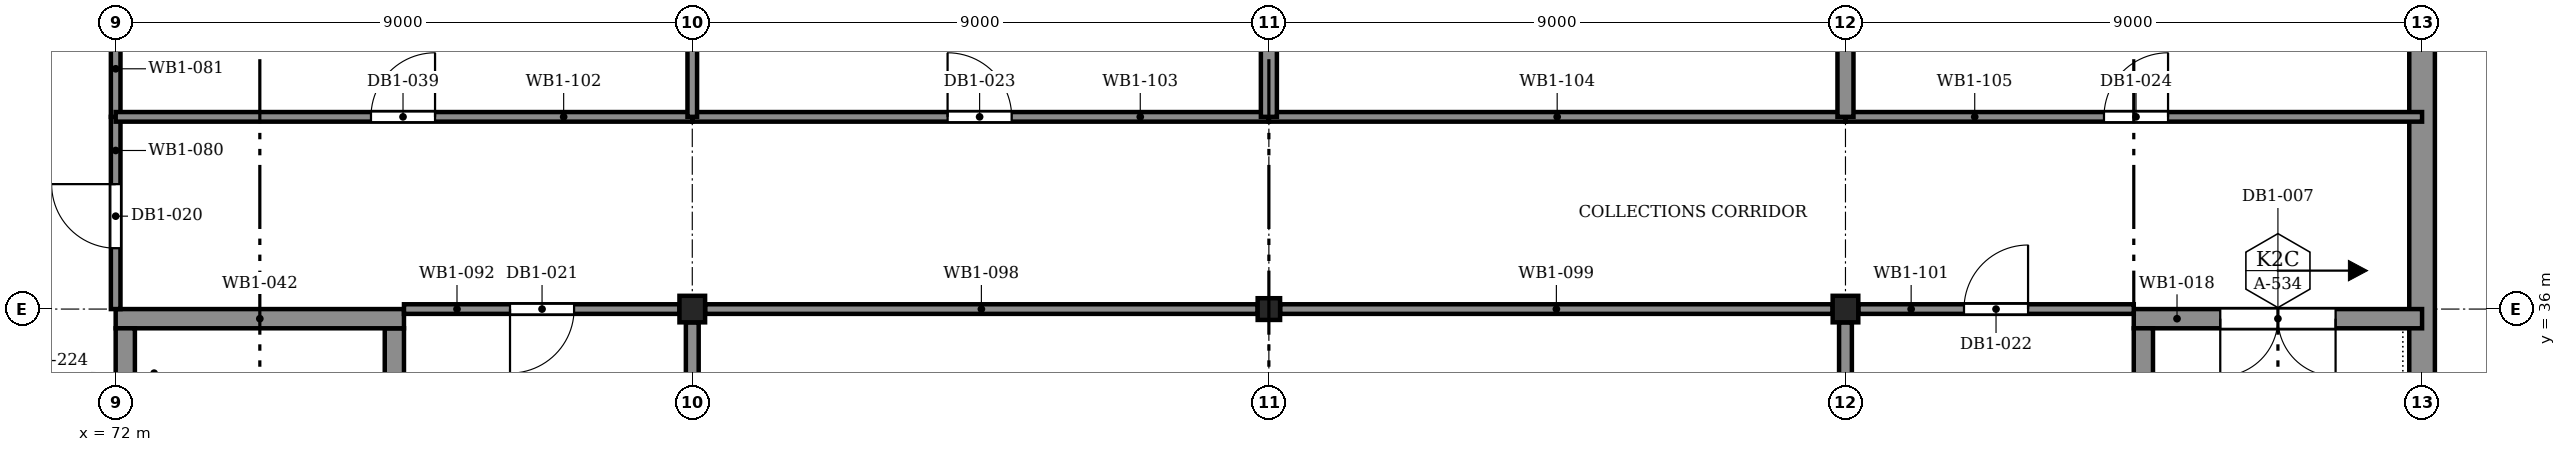
"""IFC4 building model, lengths in metres.
Left out: names, types, materials, properties, quantities, classifications, styles, units other than length and angle.
Written with IfcOpenShell. Run it as: python <this file> out.ifc"""

import sys

from ifc_helpers import new_model, si_unit, direction, frame, frame_2d, origin, origin_2d, place, context, subcontext, project, spatial, rectangle, i_section, extrude, element, fill, save


model = new_model("IFC4")
c1 = context("Model", 3, precision=1e-05, world=origin(), true_north=direction((0.0, 1.0)))
c2 = subcontext(c1, "Body", "Model", "MODEL_VIEW")
j1 = project(units=[si_unit("LENGTHUNIT", "METRE"), si_unit("PLANEANGLEUNIT", "RADIAN")], contexts=[c1])
p1 = place(None, origin())
s1 = spatial("IfcSite", under=j1, at=p1, CompositionType="ELEMENT")
p2 = place(p1, origin())
s2 = spatial("IfcBuilding", under=s1, at=p2, CompositionType="ELEMENT")
p3 = place(p2, frame((0.0, 0.0, -4.8)))
s3 = spatial("IfcBuildingStorey", under=s2, at=p3, CompositionType="ELEMENT", Elevation=-4.8)
p4 = place(p3, frame((108.0, 0.0, 0.0), z_axis=(0.0, 0.0, 1.0), x_axis=(0.0, 1.0, 0.0)))
e1 = element("IfcWall", 1, at=p4, inside=s3, PredefinedType="SOLIDWALL", context=c2, shape_type="SweptSolid", body=[
    extrude(rectangle(XDim=63.0, YDim=0.4, at=frame_2d((31.5, 0.0))), origin(), (0.0, 0.0, 1.0), 4.8),
])
p5 = place(p3, frame((81.0, 36.0, 0.0), z_axis=(0.0, 0.0, 1.0), x_axis=(1.0, 0.0, 0.0)))
e2 = element("IfcColumn", 2, at=p5, inside=s3, PredefinedType="COLUMN", context=c2, shape_type="SweptSolid", body=[
    extrude(i_section(OverallWidth=0.4, OverallDepth=0.414, WebThickness=0.025, FlangeThickness=0.032, at=origin_2d()), origin(), (0.0, 0.0, 1.0), 4.8),
])
p6 = place(p3, frame((90.0, 36.0, 0.0), z_axis=(0.0, 0.0, 1.0), x_axis=(1.0, 0.0, 0.0)))
e3 = element("IfcColumn", 3, at=p6, inside=s3, PredefinedType="COLUMN", context=c2, shape_type="SweptSolid", body=[
    extrude(i_section(OverallWidth=0.35, OverallDepth=0.339, WebThickness=0.025, FlangeThickness=0.032, at=origin_2d()), origin(), (0.0, 0.0, 1.0), 4.8),
])
p7 = place(p3, frame((99.0, 36.0, 0.0), z_axis=(0.0, 0.0, 1.0), x_axis=(1.0, 0.0, 0.0)))
e4 = element("IfcColumn", 4, at=p7, inside=s3, PredefinedType="COLUMN", context=c2, shape_type="SweptSolid", body=[
    extrude(i_section(OverallWidth=0.4, OverallDepth=0.414, WebThickness=0.025, FlangeThickness=0.032, at=origin_2d()), origin(), (0.0, 0.0, 1.0), 4.8),
])
p8 = place(p3, frame((103.5, 35.85, 0.0), z_axis=(0.0, 0.0, 1.0), x_axis=(1.0, 0.0, 0.0)))
e5 = element("IfcWall", 5, at=p8, inside=s3, PredefinedType="SOLIDWALL", context=c2, shape_type="SweptSolid", body=[
    extrude(rectangle(XDim=4.5, YDim=0.3, at=frame_2d((2.25, 0.0))), origin(), (0.0, 0.0, 1.0), 4.8),
])
p9 = place(p8, frame((1.35, 0.0, 0.0)))
e6 = element("IfcOpeningElement", 6, at=p9, cuts=e5, PredefinedType="OPENING", context=c2, shape_type="SweptSolid", body=[
    extrude(rectangle(XDim=1.8, YDim=2.1, at=frame_2d((0.9, 1.05))), frame((0.0, 0.16, 0.0), z_axis=(0.0, -1.0, 0.0), x_axis=(1.0, 0.0, 0.0)), (0.0, 0.0, 1.0), 0.32),
])
p10 = place(p3, frame((103.65, 27.3, 0.0), z_axis=(0.0, 0.0, 1.0), x_axis=(0.0, 1.0, 0.0)))
e7 = element("IfcWall", 7, at=p10, inside=s3, PredefinedType="SOLIDWALL", context=c2, shape_type="SweptSolid", body=[
    extrude(rectangle(XDim=8.4, YDim=0.3, at=frame_2d((4.2, 0.0))), origin(), (0.0, 0.0, 1.0), 4.8),
])
p11 = place(p3, frame((76.35, 27.3, 0.0), z_axis=(0.0, 0.0, 1.0), x_axis=(0.0, 1.0, 0.0)))
e8 = element("IfcWall", 8, at=p11, inside=s3, PredefinedType="SOLIDWALL", context=c2, shape_type="SweptSolid", body=[
    extrude(rectangle(XDim=8.4, YDim=0.3, at=frame_2d((4.2, 0.0))), origin(), (0.0, 0.0, 1.0), 4.8),
])
p12 = place(p11, frame((0.45, 0.0, 0.0)))
e9 = element("IfcOpeningElement", 9, at=p12, cuts=e8, PredefinedType="OPENING", context=c2, shape_type="SweptSolid", body=[
    extrude(rectangle(XDim=1.4, YDim=2.1, at=frame_2d((0.7, 1.05))), frame((0.0, 0.16, 0.0), z_axis=(0.0, -1.0, 0.0), x_axis=(1.0, 0.0, 0.0)), (0.0, 0.0, 1.0), 0.32),
])
p13 = place(p11, frame((4.925, 0.0, 0.0)))
e10 = element("IfcOpeningElement", 10, at=p13, cuts=e8, PredefinedType="OPENING", context=c2, shape_type="SweptSolid", body=[
    extrude(rectangle(XDim=1.0, YDim=2.1, at=frame_2d((0.5, 1.05))), frame((0.0, 0.16, 0.0), z_axis=(0.0, -1.0, 0.0), x_axis=(1.0, 0.0, 0.0)), (0.0, 0.0, 1.0), 0.32),
])
p14 = place(p3, frame((72.0, 35.85, 0.0), z_axis=(0.0, 0.0, 1.0), x_axis=(1.0, 0.0, 0.0)))
e11 = element("IfcWall", 11, at=p14, inside=s3, PredefinedType="SOLIDWALL", context=c2, shape_type="SweptSolid", body=[
    extrude(rectangle(XDim=4.5, YDim=0.3, at=frame_2d((2.25, 0.0))), origin(), (0.0, 0.0, 1.0), 4.8),
])
p15 = place(p3, frame((72.15, 27.3, 0.0), z_axis=(0.0, 0.0, 1.0), x_axis=(0.0, 1.0, 0.0)))
e12 = element("IfcWall", 12, at=p15, inside=s3, PredefinedType="SOLIDWALL", context=c2, shape_type="SweptSolid", body=[
    extrude(rectangle(XDim=8.4, YDim=0.3, at=frame_2d((4.2, 0.0))), origin(), (0.0, 0.0, 1.0), 4.8),
])
p16 = place(p15, frame((0.45, 0.0, 0.0)))
e13 = element("IfcOpeningElement", 13, at=p16, cuts=e12, PredefinedType="OPENING", context=c2, shape_type="SweptSolid", body=[
    extrude(rectangle(XDim=1.4, YDim=2.1, at=frame_2d((0.7, 1.05))), frame((0.0, 0.16, 0.0), z_axis=(0.0, -1.0, 0.0), x_axis=(1.0, 0.0, 0.0)), (0.0, 0.0, 1.0), 0.32),
])
p17 = place(p3, frame((72.0, 36.0, 0.0), z_axis=(0.0, 0.0, 1.0), x_axis=(0.0, 1.0, 0.0)))
e14 = element("IfcWall", 14, at=p17, inside=s3, PredefinedType="PARTITIONING", context=c2, shape_type="SweptSolid", body=[
    extrude(rectangle(XDim=3.0, YDim=0.15, at=frame_2d((1.5, 0.0))), origin(), (0.0, 0.0, 1.0), 3.758),
])
p18 = place(p17, frame((0.95, 0.0, 0.0)))
e15 = element("IfcOpeningElement", 15, at=p18, cuts=e14, PredefinedType="OPENING", context=c2, shape_type="SweptSolid", body=[
    extrude(rectangle(XDim=1.0, YDim=2.1, at=frame_2d((0.5, 1.05))), frame((0.0, 0.085, 0.0), z_axis=(0.0, -1.0, 0.0), x_axis=(1.0, 0.0, 0.0)), (0.0, 0.0, 1.0), 0.17),
])
p19 = place(p3, frame((72.0, 39.0, 0.0), z_axis=(0.0, 0.0, 1.0), x_axis=(0.0, 1.0, 0.0)))
e16 = element("IfcWall", 16, at=p19, inside=s3, PredefinedType="PARTITIONING", context=c2, shape_type="SweptSolid", body=[
    extrude(rectangle(XDim=1.5, YDim=0.15, at=frame_2d((0.75, 0.0))), origin(), (0.0, 0.0, 1.0), 3.758),
])
p20 = place(p3, frame((81.0, 27.207, 0.0), z_axis=(0.0, 0.0, 1.0), x_axis=(0.0, 1.0, 0.0)))
e17 = element("IfcWall", 17, at=p20, inside=s3, PredefinedType="PARTITIONING", context=c2, shape_type="SweptSolid", body=[
    extrude(rectangle(XDim=8.586, YDim=0.2, at=frame_2d((4.293, 0.0))), origin(), (0.0, 0.0, 1.0), 4.023),
])
p21 = place(p20, frame((3.75, 0.0, 0.0)))
e18 = element("IfcOpeningElement", 18, at=p21, cuts=e17, PredefinedType="OPENING", context=c2, shape_type="SweptSolid", body=[
    extrude(rectangle(XDim=1.0, YDim=2.1, at=frame_2d((0.5, 1.05))), frame((0.0, 0.11, 0.0), z_axis=(0.0, -1.0, 0.0), x_axis=(1.0, 0.0, 0.0)), (0.0, 0.0, 1.0), 0.22),
])
p22 = place(p3, frame((76.5, 36.0, 0.0), z_axis=(0.0, 0.0, 1.0), x_axis=(1.0, 0.0, 0.0)))
e19 = element("IfcWall", 19, at=p22, inside=s3, PredefinedType="PARTITIONING", context=c2, shape_type="SweptSolid", body=[
    extrude(rectangle(XDim=4.3, YDim=0.15, at=frame_2d((2.15, 0.0))), origin(), (0.0, 0.0, 1.0), 3.758),
])
p23 = place(p22, frame((1.655, 0.0, 0.0)))
e20 = element("IfcOpeningElement", 20, at=p23, cuts=e19, PredefinedType="OPENING", context=c2, shape_type="SweptSolid", body=[
    extrude(rectangle(XDim=1.0, YDim=2.1, at=frame_2d((0.5, 1.05))), frame((0.0, 0.085, 0.0), z_axis=(0.0, -1.0, 0.0), x_axis=(1.0, 0.0, 0.0)), (0.0, 0.0, 1.0), 0.17),
])
p24 = place(p3, frame((99.0, 27.207, 0.0), z_axis=(0.0, 0.0, 1.0), x_axis=(0.0, 1.0, 0.0)))
e21 = element("IfcWall", 21, at=p24, inside=s3, PredefinedType="PARTITIONING", context=c2, shape_type="SweptSolid", body=[
    extrude(rectangle(XDim=8.586, YDim=0.2, at=frame_2d((4.293, 0.0))), origin(), (0.0, 0.0, 1.0), 4.023),
])
for number, where, z_axis, x_axis in (
    (22, (81.2, 36.0, 0.0), (0.0, 0.0, 1.0), (1.0, 0.0, 0.0)),
    (23, (90.175, 36.0, 0.0), (0.0, 0.0, 1.0), (1.0, 0.0, 0.0)),
):
    element("IfcWall", number, at=place(p3, frame(where, z_axis=z_axis, x_axis=x_axis)), inside=s3, PredefinedType="PARTITIONING", context=c2, shape_type="SweptSolid", body=[
        extrude(rectangle(XDim=8.625, YDim=0.15, at=frame_2d((4.312, 0.0))), origin(), (0.0, 0.0, 1.0), 3.758),
    ])
p25 = place(p3, frame((99.2, 36.0, 0.0), z_axis=(0.0, 0.0, 1.0), x_axis=(1.0, 0.0, 0.0)))
e24 = element("IfcWall", 24, at=p25, inside=s3, PredefinedType="PARTITIONING", context=c2, shape_type="SweptSolid", body=[
    extrude(rectangle(XDim=4.3, YDim=0.15, at=frame_2d((2.15, 0.0))), origin(), (0.0, 0.0, 1.0), 3.758),
])
p26 = place(p25, frame((1.65, 0.0, 0.0)))
e25 = element("IfcOpeningElement", 25, at=p26, cuts=e24, PredefinedType="OPENING", context=c2, shape_type="SweptSolid", body=[
    extrude(rectangle(XDim=1.0, YDim=2.1, at=frame_2d((0.5, 1.05))), frame((0.0, 0.085, 0.0), z_axis=(0.0, -1.0, 0.0), x_axis=(1.0, 0.0, 0.0)), (0.0, 0.0, 1.0), 0.17),
])
p27 = place(p3, frame((72.0, 39.0, 0.0), z_axis=(0.0, 0.0, 1.0), x_axis=(1.0, 0.0, 0.0)))
e26 = element("IfcWall", 26, at=p27, inside=s3, PredefinedType="PARTITIONING", context=c2, shape_type="SweptSolid", body=[
    extrude(rectangle(XDim=9.0, YDim=0.15, at=frame_2d((4.5, 0.0))), origin(), (0.0, 0.0, 1.0), 3.758),
])
p28 = place(p27, frame((3.985, 0.0, 0.0)))
e27 = element("IfcOpeningElement", 27, at=p28, cuts=e26, PredefinedType="OPENING", context=c2, shape_type="SweptSolid", body=[
    extrude(rectangle(XDim=1.0, YDim=2.1, at=frame_2d((0.5, 1.05))), frame((0.0, 0.085, 0.0), z_axis=(0.0, -1.0, 0.0), x_axis=(1.0, 0.0, 0.0)), (0.0, 0.0, 1.0), 0.17),
])
p29 = place(p3, frame((81.0, 39.0, 0.0), z_axis=(0.0, 0.0, 1.0), x_axis=(1.0, 0.0, 0.0)))
e28 = element("IfcWall", 28, at=p29, inside=s3, PredefinedType="PARTITIONING", context=c2, shape_type="SweptSolid", body=[
    extrude(rectangle(XDim=9.0, YDim=0.15, at=frame_2d((4.5, 0.0))), origin(), (0.0, 0.0, 1.0), 3.758),
])
p30 = place(p29, frame((3.985, 0.0, 0.0)))
e29 = element("IfcOpeningElement", 29, at=p30, cuts=e28, PredefinedType="OPENING", context=c2, shape_type="SweptSolid", body=[
    extrude(rectangle(XDim=1.0, YDim=2.1, at=frame_2d((0.5, 1.05))), frame((0.0, 0.085, 0.0), z_axis=(0.0, -1.0, 0.0), x_axis=(1.0, 0.0, 0.0)), (0.0, 0.0, 1.0), 0.17),
])
p31 = place(p3, frame((90.0, 39.0, 0.0), z_axis=(0.0, 0.0, 1.0), x_axis=(1.0, 0.0, 0.0)))
e30 = element("IfcWall", 30, at=p31, inside=s3, PredefinedType="PARTITIONING", context=c2, shape_type="SweptSolid", body=[
    extrude(rectangle(XDim=9.0, YDim=0.15, at=frame_2d((4.5, 0.0))), origin(), (0.0, 0.0, 1.0), 3.758),
])
p32 = place(p3, frame((99.0, 39.0, 0.0), z_axis=(0.0, 0.0, 1.0), x_axis=(1.0, 0.0, 0.0)))
e31 = element("IfcWall", 31, at=p32, inside=s3, PredefinedType="PARTITIONING", context=c2, shape_type="SweptSolid", body=[
    extrude(rectangle(XDim=9.0, YDim=0.15, at=frame_2d((4.5, 0.0))), origin(), (0.0, 0.0, 1.0), 3.758),
])
p33 = place(p32, frame((4.035, 0.0, 0.0)))
e32 = element("IfcOpeningElement", 32, at=p33, cuts=e31, PredefinedType="OPENING", context=c2, shape_type="SweptSolid", body=[
    extrude(rectangle(XDim=1.0, YDim=2.1, at=frame_2d((0.5, 1.05))), frame((0.0, 0.085, 0.0), z_axis=(0.0, -1.0, 0.0), x_axis=(1.0, 0.0, 0.0)), (0.0, 0.0, 1.0), 0.17),
])
p34 = place(p3, frame((81.0, 39.0, 0.0), z_axis=(0.0, 0.0, 1.0), x_axis=(0.0, 1.0, 0.0)))
e33 = element("IfcWall", 33, at=p34, inside=s3, PredefinedType="PARTITIONING", context=c2, shape_type="SweptSolid", body=[
    extrude(rectangle(XDim=6.0, YDim=0.15, at=frame_2d((3.0, 0.0))), origin(), (0.0, 0.0, 1.0), 3.758),
])
for number, where, z_axis, x_axis in (
    (34, (90.0, 39.0, 0.0), (0.0, 0.0, 1.0), (0.0, 1.0, 0.0)),
    (35, (99.0, 39.0, 0.0), (0.0, 0.0, 1.0), (0.0, 1.0, 0.0)),
):
    element("IfcWall", number, at=place(p3, frame(where, z_axis=z_axis, x_axis=x_axis)), inside=s3, PredefinedType="PARTITIONING", context=c2, shape_type="SweptSolid", body=[
        extrude(rectangle(XDim=5.836, YDim=0.25, at=frame_2d((2.918, 0.0))), origin(), (0.0, 0.0, 1.0), 3.758),
    ])
p35 = place(p9, frame((1.8, 0.0, 0.0), z_axis=(0.0, 0.0, 1.0), x_axis=(-1.0, 0.0, 0.0)))
e36 = element("IfcDoor", 36, at=p35, inside=s3, OperationType="DOUBLE_DOOR_SINGLE_SWING", PredefinedType="DOOR", context=c2, shape_type="SweptSolid", body=[
    extrude(rectangle(XDim=1.8, YDim=2.1, at=frame_2d((0.9, 1.05))), frame((0.0, 0.025, 0.0), z_axis=(0.0, -1.0, 0.0), x_axis=(1.0, 0.0, 0.0)), (0.0, 0.0, 1.0), 0.05),
])
fill(e6, e36)
p36 = place(p18, origin())
e37 = element("IfcDoor", 37, at=p36, inside=s3, OperationType="SINGLE_SWING_LEFT", PredefinedType="DOOR", context=c2, shape_type="SweptSolid", body=[
    extrude(rectangle(XDim=1.0, YDim=2.1, at=frame_2d((0.5, 1.05))), frame((0.0, 0.025, 0.0), z_axis=(0.0, -1.0, 0.0), x_axis=(1.0, 0.0, 0.0)), (0.0, 0.0, 1.0), 0.05),
])
fill(e15, e37)
p37 = place(p23, frame((1.0, 0.0, 0.0), z_axis=(0.0, 0.0, 1.0), x_axis=(-1.0, 0.0, 0.0)))
e38 = element("IfcDoor", 38, at=p37, inside=s3, OperationType="SINGLE_SWING_LEFT", PredefinedType="DOOR", context=c2, shape_type="SweptSolid", body=[
    extrude(rectangle(XDim=1.0, YDim=2.1, at=frame_2d((0.5, 1.05))), frame((0.0, 0.025, 0.0), z_axis=(0.0, -1.0, 0.0), x_axis=(1.0, 0.0, 0.0)), (0.0, 0.0, 1.0), 0.05),
])
fill(e20, e38)
p38 = place(p26, origin())
e39 = element("IfcDoor", 39, at=p38, inside=s3, OperationType="SINGLE_SWING_LEFT", PredefinedType="DOOR", context=c2, shape_type="SweptSolid", body=[
    extrude(rectangle(XDim=1.0, YDim=2.1, at=frame_2d((0.5, 1.05))), frame((0.0, 0.025, 0.0), z_axis=(0.0, -1.0, 0.0), x_axis=(1.0, 0.0, 0.0)), (0.0, 0.0, 1.0), 0.05),
])
fill(e25, e39)
p39 = place(p30, origin())
e40 = element("IfcDoor", 40, at=p39, inside=s3, OperationType="SINGLE_SWING_RIGHT", PredefinedType="DOOR", context=c2, shape_type="SweptSolid", body=[
    extrude(rectangle(XDim=1.0, YDim=2.1, at=frame_2d((0.5, 1.05))), frame((0.0, 0.025, 0.0), z_axis=(0.0, -1.0, 0.0), x_axis=(1.0, 0.0, 0.0)), (0.0, 0.0, 1.0), 0.05),
])
fill(e29, e40)
p40 = place(p33, origin())
e41 = element("IfcDoor", 41, at=p40, inside=s3, OperationType="SINGLE_SWING_LEFT", PredefinedType="DOOR", context=c2, shape_type="SweptSolid", body=[
    extrude(rectangle(XDim=1.0, YDim=2.1, at=frame_2d((0.5, 1.05))), frame((0.0, 0.025, 0.0), z_axis=(0.0, -1.0, 0.0), x_axis=(1.0, 0.0, 0.0)), (0.0, 0.0, 1.0), 0.05),
])
fill(e32, e41)
p41 = place(p28, origin())
e42 = element("IfcDoor", 42, at=p41, inside=s3, OperationType="SINGLE_SWING_LEFT", PredefinedType="DOOR", context=c2, shape_type="SweptSolid", body=[
    extrude(rectangle(XDim=1.0, YDim=2.1, at=frame_2d((0.5, 1.05))), frame((0.0, 0.025, 0.0), z_axis=(0.0, -1.0, 0.0), x_axis=(1.0, 0.0, 0.0)), (0.0, 0.0, 1.0), 0.05),
])
fill(e27, e42)
save(model, sys.argv[1])
